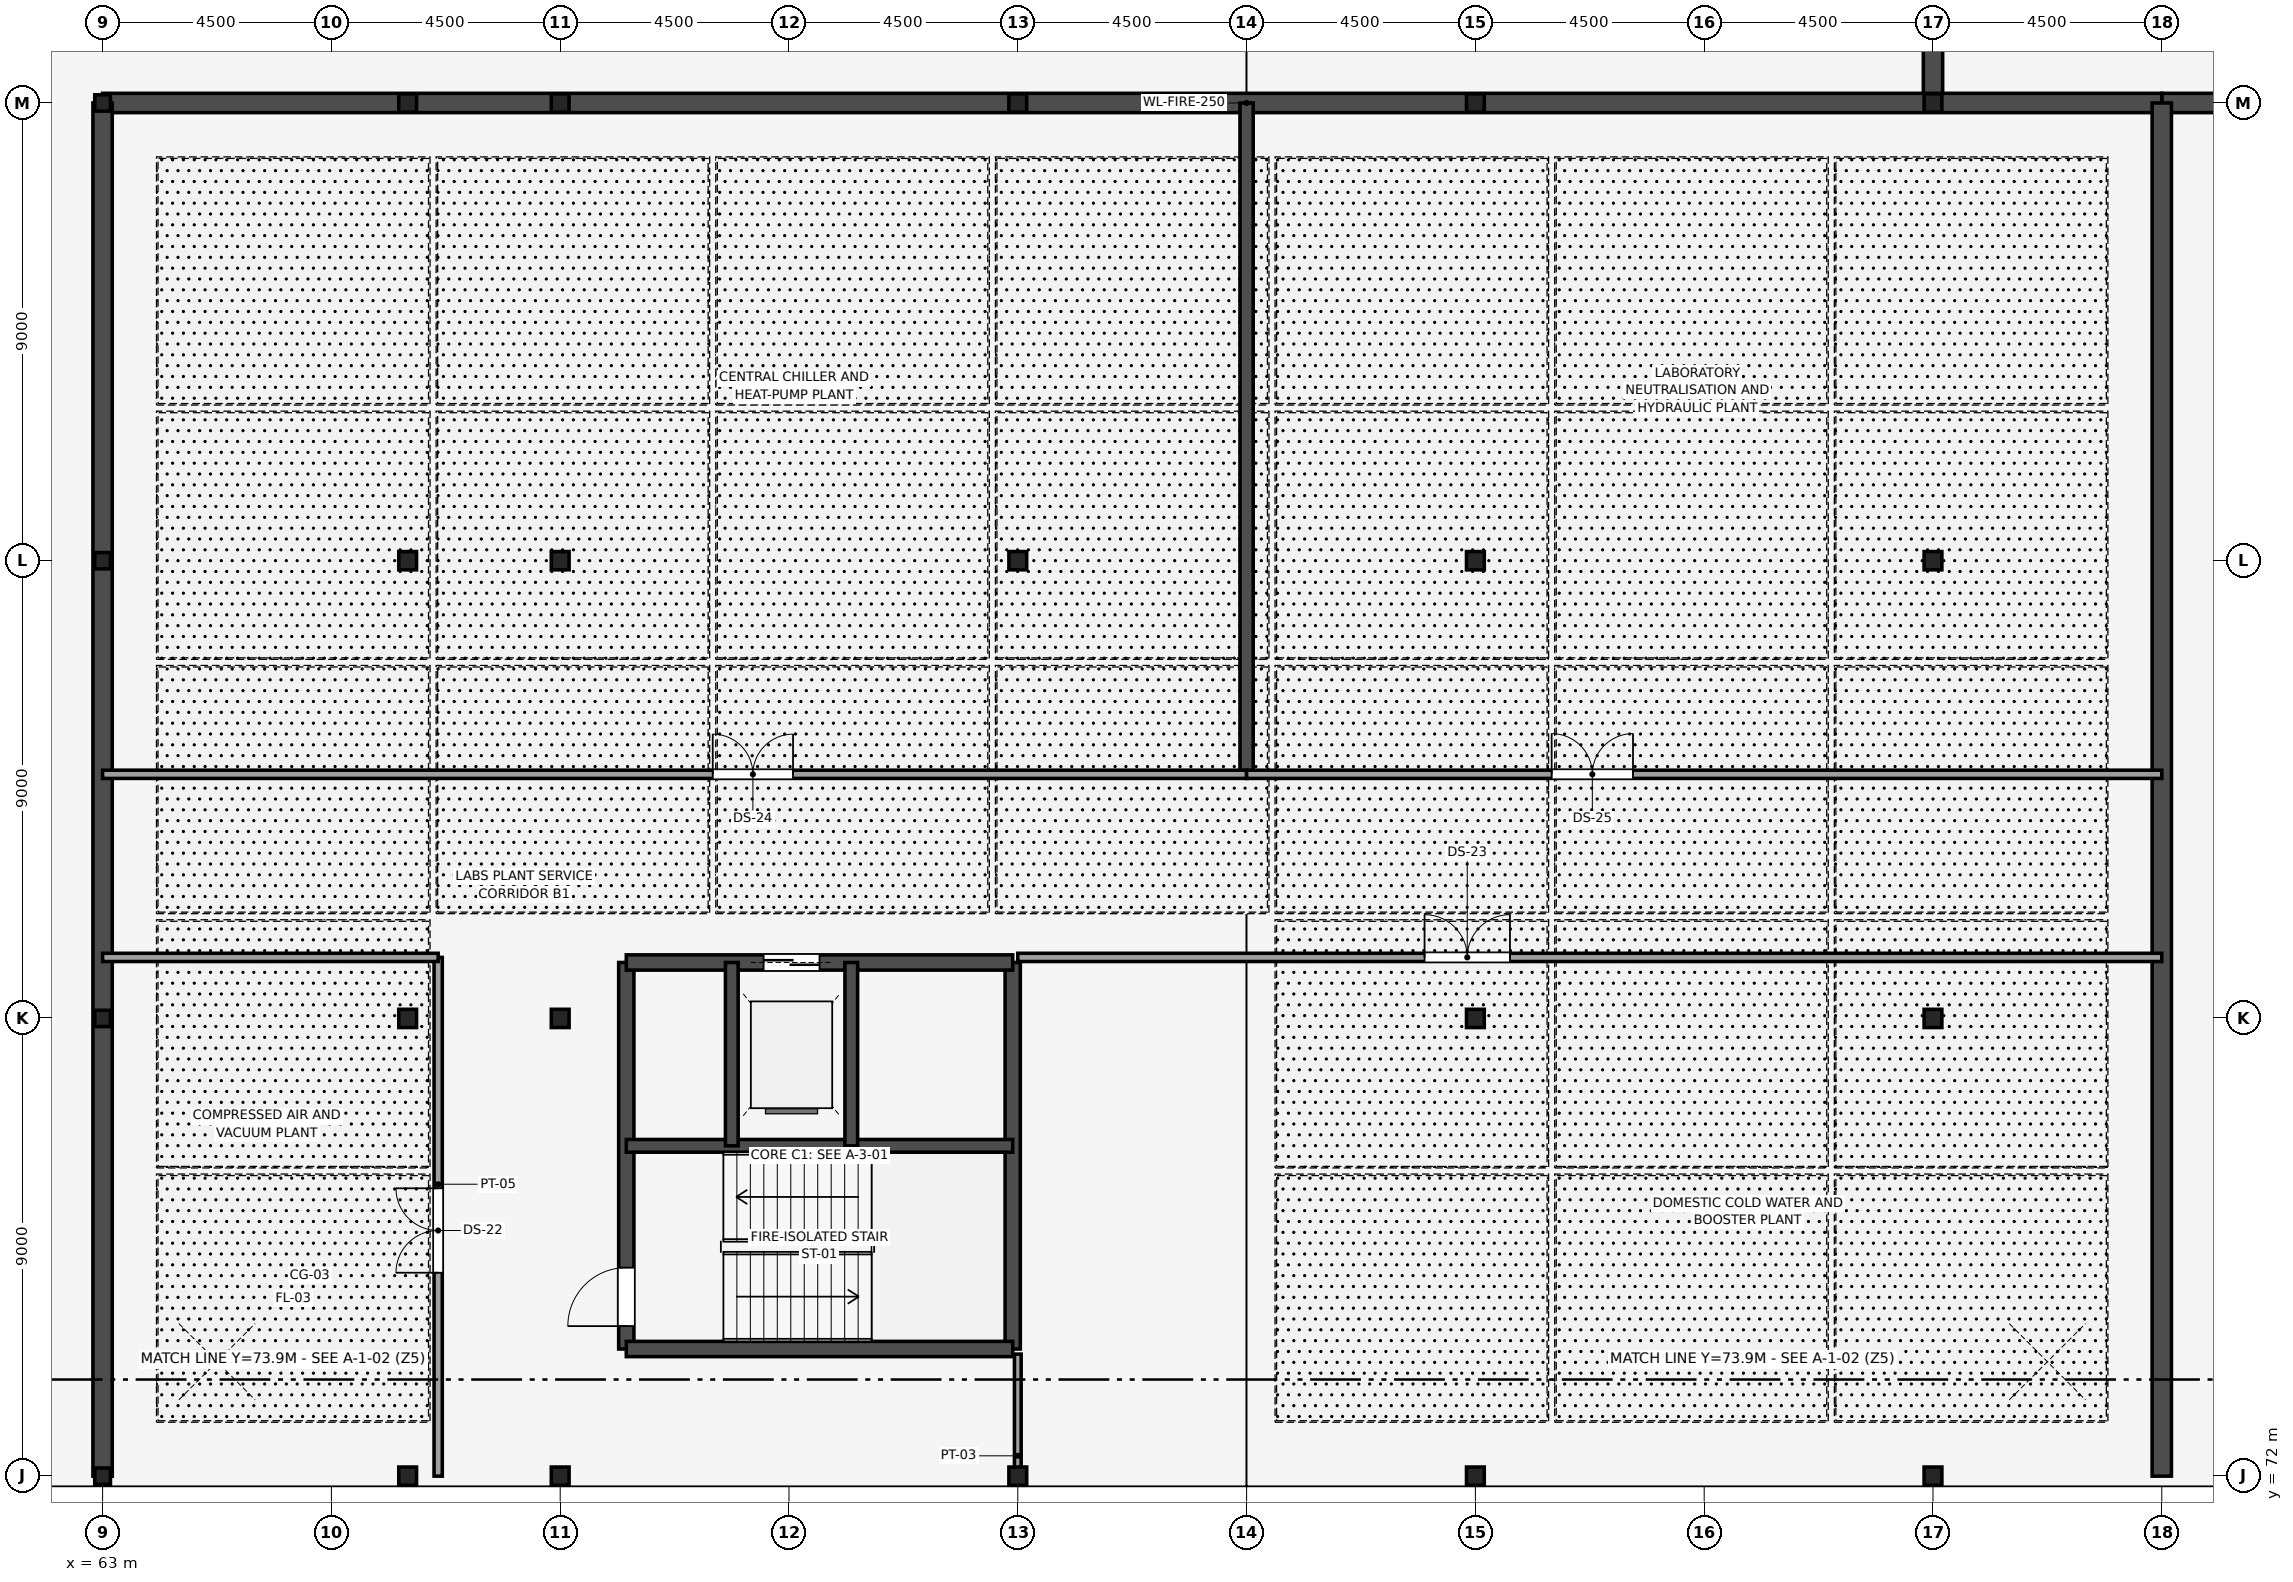
"""IFC4 building model, lengths in metres.
Left out: names, types, materials, properties, quantities, classifications, styles, units other than length and angle.
Written with IfcOpenShell. Run it as: python <this file> out.ifc"""

import sys

from ifc_helpers import new_model, si_unit, direction, frame, frame_2d, origin, origin_2d, place, context, subcontext, project, spatial, rectangle, i_section, extrude, element, fill, save


model = new_model("IFC4")
c1 = context("Model", 3, precision=1e-05, world=origin(), true_north=direction((0.0, 1.0)))
c2 = subcontext(c1, "Body", "Model", "MODEL_VIEW")
j1 = project(units=[si_unit("LENGTHUNIT", "METRE"), si_unit("PLANEANGLEUNIT", "RADIAN")], contexts=[c1])
p1 = place(None, origin())
s1 = spatial("IfcSite", under=j1, at=p1, CompositionType="ELEMENT")
p2 = place(p1, origin())
s2 = spatial("IfcBuilding", under=s1, at=p2, CompositionType="ELEMENT")
p3 = place(p2, frame((0.0, 0.0, -4.5)))
s3 = spatial("IfcBuildingStorey", under=s2, at=p3, CompositionType="ELEMENT", Elevation=-4.5)
for number, where, z_axis, x_axis in (
    (1, (63.0, 72.0, 0.0), (0.0, 0.0, 1.0), (1.0, 0.0, 0.0)),
    (2, (63.0, 81.0, 0.0), (0.0, 0.0, 1.0), (1.0, 0.0, 0.0)),
    (3, (63.0, 90.0, 0.0), (0.0, 0.0, 1.0), (1.0, 0.0, 0.0)),
    (4, (63.0, 99.0, 0.0), (0.0, 0.0, 1.0), (1.0, 0.0, 0.0)),
):
    element("IfcColumn", number, at=place(p3, frame(where, z_axis=z_axis, x_axis=x_axis)), inside=s3, PredefinedType="COLUMN", context=c2, shape_type="SweptSolid", body=[
        extrude(i_section(OverallWidth=0.309, OverallDepth=0.321, WebThickness=0.014, FlangeThickness=0.022, FilletRadius=0.017, at=origin_2d()), origin(), (0.0, 0.0, 1.0), 4.5),
    ])
for number, where, z_axis, x_axis in (
    (5, (69.0, 72.0, 0.0), (0.0, 0.0, 1.0), (1.0, 0.0, 0.0)),
    (6, (69.0, 81.0, 0.0), (0.0, 0.0, 1.0), (1.0, 0.0, 0.0)),
    (7, (69.0, 90.0, 0.0), (0.0, 0.0, 1.0), (1.0, 0.0, 0.0)),
    (8, (69.0, 99.0, 0.0), (0.0, 0.0, 1.0), (1.0, 0.0, 0.0)),
    (9, (72.0, 72.0, 0.0), (0.0, 0.0, 1.0), (1.0, 0.0, 0.0)),
    (10, (72.0, 81.0, 0.0), (0.0, 0.0, 1.0), (1.0, 0.0, 0.0)),
    (11, (72.0, 90.0, 0.0), (0.0, 0.0, 1.0), (1.0, 0.0, 0.0)),
    (12, (72.0, 99.0, 0.0), (0.0, 0.0, 1.0), (1.0, 0.0, 0.0)),
    (13, (81.0, 72.0, 0.0), (0.0, 0.0, 1.0), (1.0, 0.0, 0.0)),
    (14, (81.0, 90.0, 0.0), (0.0, 0.0, 1.0), (1.0, 0.0, 0.0)),
    (15, (81.0, 99.0, 0.0), (0.0, 0.0, 1.0), (1.0, 0.0, 0.0)),
    (16, (90.0, 72.0, 0.0), (0.0, 0.0, 1.0), (1.0, 0.0, 0.0)),
    (17, (90.0, 81.0, 0.0), (0.0, 0.0, 1.0), (1.0, 0.0, 0.0)),
    (18, (90.0, 90.0, 0.0), (0.0, 0.0, 1.0), (1.0, 0.0, 0.0)),
    (19, (90.0, 99.0, 0.0), (0.0, 0.0, 1.0), (1.0, 0.0, 0.0)),
    (20, (99.0, 72.0, 0.0), (0.0, 0.0, 1.0), (1.0, 0.0, 0.0)),
    (21, (99.0, 81.0, 0.0), (0.0, 0.0, 1.0), (1.0, 0.0, 0.0)),
    (22, (99.0, 90.0, 0.0), (0.0, 0.0, 1.0), (1.0, 0.0, 0.0)),
    (23, (99.0, 99.0, 0.0), (0.0, 0.0, 1.0), (1.0, 0.0, 0.0)),
):
    element("IfcColumn", number, at=place(p3, frame(where, z_axis=z_axis, x_axis=x_axis)), inside=s3, PredefinedType="COLUMN", context=c2, shape_type="SweptSolid", body=[
        extrude(i_section(OverallWidth=0.35, OverallDepth=0.359, WebThickness=0.016, FlangeThickness=0.024, FilletRadius=0.014, at=origin_2d()), origin(), (0.0, 0.0, 1.0), 4.5),
    ])
p4 = place(p3, frame((73.3, 74.5, 0.0), z_axis=(0.0, 0.0, 1.0), x_axis=(0.0, 1.0, 0.0)))
e24 = element("IfcWall", 24, at=p4, inside=s3, PredefinedType="SHEAR", context=c2, shape_type="SweptSolid", body=[
    extrude(rectangle(XDim=7.6, YDim=0.3, at=frame_2d((3.8, 0.0))), origin(), (0.0, 0.0, 1.0), 4.5),
])
p5 = place(p4, frame((0.45, 0.0, 0.0)))
e25 = element("IfcOpeningElement", 25, at=p5, cuts=e24, PredefinedType="OPENING", context=c2, shape_type="SweptSolid", body=[
    extrude(rectangle(XDim=1.15, YDim=2.15, at=frame_2d((0.575, 1.075))), frame((0.0, 0.16, 0.0), z_axis=(0.0, -1.0, 0.0), x_axis=(1.0, 0.0, 0.0)), (0.0, 0.0, 1.0), 0.32),
])
p6 = place(p3, frame((80.9, 74.5, 0.0), z_axis=(0.0, 0.0, 1.0), x_axis=(0.0, 1.0, 0.0)))
e26 = element("IfcWall", 26, at=p6, inside=s3, PredefinedType="SHEAR", context=c2, shape_type="SweptSolid", body=[
    extrude(rectangle(XDim=7.6, YDim=0.3, at=frame_2d((3.8, 0.0))), origin(), (0.0, 0.0, 1.0), 4.5),
])
p7 = place(p3, frame((73.3, 74.5, 0.0), z_axis=(0.0, 0.0, 1.0), x_axis=(1.0, 0.0, 0.0)))
e27 = element("IfcWall", 27, at=p7, inside=s3, PredefinedType="SHEAR", context=c2, shape_type="SweptSolid", body=[
    extrude(rectangle(XDim=7.6, YDim=0.3, at=frame_2d((3.8, 0.0))), origin(), (0.0, 0.0, 1.0), 4.5),
])
p8 = place(p3, frame((73.3, 82.1, 0.0), z_axis=(0.0, 0.0, 1.0), x_axis=(1.0, 0.0, 0.0)))
e28 = element("IfcWall", 28, at=p8, inside=s3, PredefinedType="SHEAR", context=c2, shape_type="SweptSolid", body=[
    extrude(rectangle(XDim=7.6, YDim=0.3, at=frame_2d((3.8, 0.0))), origin(), (0.0, 0.0, 1.0), 4.5),
])
p9 = place(p8, frame((2.7, 0.0, 0.0)))
e29 = element("IfcOpeningElement", 29, at=p9, cuts=e28, PredefinedType="OPENING", context=c2, shape_type="SweptSolid", body=[
    extrude(rectangle(XDim=1.1, YDim=2.2, at=frame_2d((0.55, 1.1))), frame((0.0, 0.16, 0.0), z_axis=(0.0, -1.0, 0.0), x_axis=(1.0, 0.0, 0.0)), (0.0, 0.0, 1.0), 0.32),
])
p10 = place(p3, frame((73.3, 78.495, 0.0), z_axis=(0.0, 0.0, 1.0), x_axis=(1.0, 0.0, 0.0)))
e30 = element("IfcWall", 30, at=p10, inside=s3, PredefinedType="SHEAR", context=c2, shape_type="SweptSolid", body=[
    extrude(rectangle(XDim=7.6, YDim=0.25, at=frame_2d((3.8, 0.0))), origin(), (0.0, 0.0, 1.0), 4.5),
])
for number, where, z_axis, x_axis in (
    (31, (75.375, 78.495, 0.0), (0.0, 0.0, 1.0), (0.0, 1.0, 0.0)),
    (32, (77.725, 78.495, 0.0), (0.0, 0.0, 1.0), (0.0, 1.0, 0.0)),
):
    element("IfcWall", number, at=place(p3, frame(where, z_axis=z_axis, x_axis=x_axis)), inside=s3, PredefinedType="SHEAR", context=c2, shape_type="SweptSolid", body=[
        extrude(rectangle(XDim=3.605, YDim=0.25, at=frame_2d((1.802, 0.0))), origin(), (0.0, 0.0, 1.0), 4.5),
    ])
p11 = place(p3, frame((99.0, 99.0, 0.0), z_axis=(0.0, 0.0, 1.0), x_axis=(0.0, 1.0, 0.0)))
e33 = element("IfcWall", 33, at=p11, inside=s3, PredefinedType="SHEAR", context=c2, shape_type="SweptSolid", body=[
    extrude(rectangle(XDim=12.6, YDim=0.38, at=frame_2d((6.3, 0.0))), origin(), (0.0, 0.0, 1.0), 4.26),
])
p12 = place(p3, frame((55.2, 72.0, 0.0), z_axis=(0.0, 0.0, 1.0), x_axis=(1.0, 0.0, 0.0)))
e34 = element("IfcWall", 34, at=p12, inside=s3, PredefinedType="SHEAR", context=c2, shape_type="SweptSolid", body=[
    extrude(rectangle(XDim=7.8, YDim=0.38, at=frame_2d((3.9, 0.0))), origin(), (0.0, 0.0, 1.0), 4.26),
])
for number, where, z_axis, x_axis in (
    (35, (103.5, 72.0, 0.0), (0.0, 0.0, 1.0), (1.0, 0.0, 0.0)),
    (36, (103.5, 99.0, 0.0), (0.0, 0.0, 1.0), (1.0, 0.0, 0.0)),
):
    element("IfcWall", number, at=place(p3, frame(where, z_axis=z_axis, x_axis=x_axis)), inside=s3, PredefinedType="SHEAR", context=c2, shape_type="SweptSolid", body=[
        extrude(rectangle(XDim=9.0, YDim=0.38, at=frame_2d((4.5, 0.0))), origin(), (0.0, 0.0, 1.0), 4.26),
    ])
for number, where, z_axis, x_axis in (
    (37, (63.0, 72.0, 0.0), (0.0, 0.0, 1.0), (1.0, 0.0, 0.0)),
    (38, (63.0, 99.0, 0.0), (0.0, 0.0, 1.0), (1.0, 0.0, 0.0)),
):
    element("IfcWall", number, at=place(p3, frame(where, z_axis=z_axis, x_axis=x_axis)), inside=s3, PredefinedType="SHEAR", context=c2, shape_type="SweptSolid", body=[
        extrude(rectangle(XDim=40.5, YDim=0.38, at=frame_2d((20.25, 0.0))), origin(), (0.0, 0.0, 1.0), 4.26),
    ])
for number, where, z_axis, x_axis in (
    (39, (63.0, 72.0, 0.0), (0.0, 0.0, 1.0), (0.0, 1.0, 0.0)),
    (40, (103.5, 72.0, 0.0), (0.0, 0.0, 1.0), (0.0, 1.0, 0.0)),
):
    element("IfcWall", number, at=place(p3, frame(where, z_axis=z_axis, x_axis=x_axis)), inside=s3, PredefinedType="SHEAR", context=c2, shape_type="SweptSolid", body=[
        extrude(rectangle(XDim=27.0, YDim=0.38, at=frame_2d((13.5, 0.0))), origin(), (0.0, 0.0, 1.0), 4.26),
    ])
p13 = place(p3, frame((85.5, 85.8, 0.0), z_axis=(0.0, 0.0, 1.0), x_axis=(0.0, 1.0, 0.0)))
e41 = element("IfcWall", 41, at=p13, inside=s3, PredefinedType="SHEAR", context=c2, shape_type="SweptSolid", body=[
    extrude(rectangle(XDim=13.2, YDim=0.26, at=frame_2d((6.6, 0.0))), origin(), (0.0, 0.0, 1.0), 4.26),
])
p14 = place(p3, frame((69.6, 72.0, 0.0), z_axis=(0.0, 0.0, 1.0), x_axis=(0.0, 1.0, 0.0)))
e42 = element("IfcWall", 42, at=p14, inside=s3, PredefinedType="PARTITIONING", context=c2, shape_type="SweptSolid", body=[
    extrude(rectangle(XDim=10.2, YDim=0.162, at=frame_2d((5.1, 0.0))), origin(), (0.0, 0.0, 1.0), 4.26),
])
p15 = place(p14, frame((4.0, 0.0, 0.0)))
e43 = element("IfcOpeningElement", 43, at=p15, cuts=e42, PredefinedType="OPENING", context=c2, shape_type="SweptSolid", body=[
    extrude(rectangle(XDim=1.66, YDim=2.225, at=frame_2d((0.83, 1.113))), frame((0.0, 0.091, 0.0), z_axis=(0.0, -1.0, 0.0), x_axis=(1.0, 0.0, 0.0)), (0.0, 0.0, 1.0), 0.182),
])
p16 = place(p3, frame((63.0, 82.2, 0.0), z_axis=(0.0, 0.0, 1.0), x_axis=(1.0, 0.0, 0.0)))
e44 = element("IfcWall", 44, at=p16, inside=s3, PredefinedType="PARTITIONING", context=c2, shape_type="SweptSolid", body=[
    extrude(rectangle(XDim=6.6, YDim=0.162, at=frame_2d((3.3, 0.0))), origin(), (0.0, 0.0, 1.0), 4.26),
])
p17 = place(p3, frame((81.0, 72.0, 0.0), z_axis=(0.0, 0.0, 1.0), x_axis=(0.0, 1.0, 0.0)))
e45 = element("IfcWall", 45, at=p17, inside=s3, PredefinedType="PARTITIONING", context=c2, shape_type="SweptSolid", body=[
    extrude(rectangle(XDim=2.4, YDim=0.132, at=frame_2d((1.2, 0.0))), origin(), (0.0, 0.0, 1.0), 3.54),
])
p18 = place(p3, frame((81.0, 82.2, 0.0), z_axis=(0.0, 0.0, 1.0), x_axis=(1.0, 0.0, 0.0)))
e46 = element("IfcWall", 46, at=p18, inside=s3, PredefinedType="PARTITIONING", context=c2, shape_type="SweptSolid", body=[
    extrude(rectangle(XDim=22.5, YDim=0.162, at=frame_2d((11.25, 0.0))), origin(), (0.0, 0.0, 1.0), 4.26),
])
p19 = place(p18, frame((8.0, 0.0, 0.0)))
e47 = element("IfcOpeningElement", 47, at=p19, cuts=e46, PredefinedType="OPENING", context=c2, shape_type="SweptSolid", body=[
    extrude(rectangle(XDim=1.68, YDim=2.225, at=frame_2d((0.84, 1.113))), frame((0.0, 0.091, 0.0), z_axis=(0.0, -1.0, 0.0), x_axis=(1.0, 0.0, 0.0)), (0.0, 0.0, 1.0), 0.182),
])
p20 = place(p3, frame((63.0, 85.8, 0.0), z_axis=(0.0, 0.0, 1.0), x_axis=(1.0, 0.0, 0.0)))
e48 = element("IfcWall", 48, at=p20, inside=s3, PredefinedType="PARTITIONING", context=c2, shape_type="SweptSolid", body=[
    extrude(rectangle(XDim=22.5, YDim=0.162, at=frame_2d((11.25, 0.0))), origin(), (0.0, 0.0, 1.0), 4.26),
])
p21 = place(p20, frame((12.0, 0.0, 0.0)))
e49 = element("IfcOpeningElement", 49, at=p21, cuts=e48, PredefinedType="OPENING", context=c2, shape_type="SweptSolid", body=[
    extrude(rectangle(XDim=1.58, YDim=2.25, at=frame_2d((0.79, 1.125))), frame((0.0, 0.091, 0.0), z_axis=(0.0, -1.0, 0.0), x_axis=(1.0, 0.0, 0.0)), (0.0, 0.0, 1.0), 0.182),
])
p22 = place(p3, frame((85.5, 85.8, 0.0), z_axis=(0.0, 0.0, 1.0), x_axis=(1.0, 0.0, 0.0)))
e50 = element("IfcWall", 50, at=p22, inside=s3, PredefinedType="PARTITIONING", context=c2, shape_type="SweptSolid", body=[
    extrude(rectangle(XDim=18.0, YDim=0.162, at=frame_2d((9.0, 0.0))), origin(), (0.0, 0.0, 1.0), 4.26),
])
p23 = place(p22, frame((6.0, 0.0, 0.0)))
e51 = element("IfcOpeningElement", 51, at=p23, cuts=e50, PredefinedType="OPENING", context=c2, shape_type="SweptSolid", body=[
    extrude(rectangle(XDim=1.6, YDim=2.25, at=frame_2d((0.8, 1.125))), frame((0.0, 0.091, 0.0), z_axis=(0.0, -1.0, 0.0), x_axis=(1.0, 0.0, 0.0)), (0.0, 0.0, 1.0), 0.182),
])
p24 = place(p5, origin())
e52 = element("IfcDoor", 52, at=p24, inside=s3, OperationType="SINGLE_SWING_LEFT", PredefinedType="DOOR", context=c2, shape_type="SweptSolid", body=[
    extrude(rectangle(XDim=1.15, YDim=2.15, at=frame_2d((0.575, 1.075))), frame((0.0, 0.025, 0.0), z_axis=(0.0, -1.0, 0.0), x_axis=(1.0, 0.0, 0.0)), (0.0, 0.0, 1.0), 0.05),
])
fill(e25, e52)
p25 = place(p9, origin())
e53 = element("IfcDoor", 53, at=p25, inside=s3, OperationType="DOUBLE_DOOR_SLIDING", PredefinedType="DOOR", context=c2, shape_type="SweptSolid", body=[
    extrude(rectangle(XDim=1.1, YDim=2.2, at=frame_2d((0.55, 1.1))), frame((0.0, 0.025, 0.0), z_axis=(0.0, -1.0, 0.0), x_axis=(1.0, 0.0, 0.0)), (0.0, 0.0, 1.0), 0.05),
])
fill(e29, e53)
p26 = place(p15, origin())
e54 = element("IfcDoor", 54, at=p26, inside=s3, OperationType="DOUBLE_DOOR_SINGLE_SWING", PredefinedType="DOOR", context=c2, shape_type="SweptSolid", body=[
    extrude(rectangle(XDim=1.66, YDim=2.225, at=frame_2d((0.83, 1.113))), frame((0.0, 0.025, 0.0), z_axis=(0.0, -1.0, 0.0), x_axis=(1.0, 0.0, 0.0)), (0.0, 0.0, 1.0), 0.05),
])
fill(e43, e54)
p27 = place(p19, origin())
e55 = element("IfcDoor", 55, at=p27, inside=s3, OperationType="DOUBLE_DOOR_SINGLE_SWING", PredefinedType="DOOR", context=c2, shape_type="SweptSolid", body=[
    extrude(rectangle(XDim=1.68, YDim=2.225, at=frame_2d((0.84, 1.113))), frame((0.0, 0.025, 0.0), z_axis=(0.0, -1.0, 0.0), x_axis=(1.0, 0.0, 0.0)), (0.0, 0.0, 1.0), 0.05),
])
fill(e47, e55)
p28 = place(p21, origin())
e56 = element("IfcDoor", 56, at=p28, inside=s3, OperationType="DOUBLE_DOOR_SINGLE_SWING", PredefinedType="DOOR", context=c2, shape_type="SweptSolid", body=[
    extrude(rectangle(XDim=1.58, YDim=2.25, at=frame_2d((0.79, 1.125))), frame((0.0, 0.025, 0.0), z_axis=(0.0, -1.0, 0.0), x_axis=(1.0, 0.0, 0.0)), (0.0, 0.0, 1.0), 0.05),
])
fill(e49, e56)
p29 = place(p23, origin())
e57 = element("IfcDoor", 57, at=p29, inside=s3, OperationType="DOUBLE_DOOR_SINGLE_SWING", PredefinedType="DOOR", context=c2, shape_type="SweptSolid", body=[
    extrude(rectangle(XDim=1.6, YDim=2.25, at=frame_2d((0.8, 1.125))), frame((0.0, 0.025, 0.0), z_axis=(0.0, -1.0, 0.0), x_axis=(1.0, 0.0, 0.0)), (0.0, 0.0, 1.0), 0.05),
])
fill(e51, e57)
save(model, sys.argv[1])
